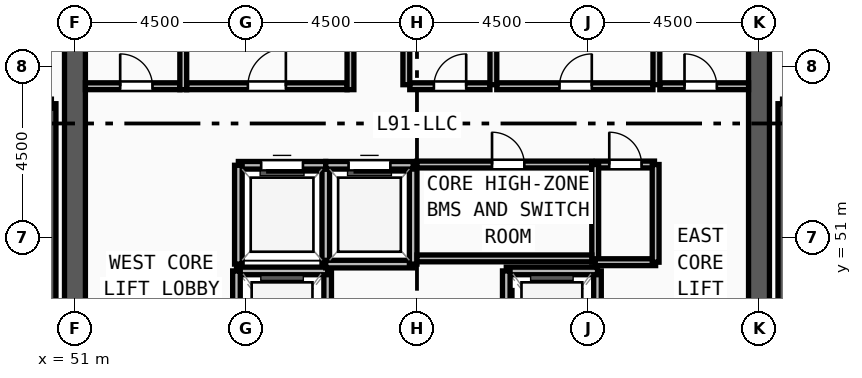
"""IFC4 building model, lengths in metres.
Left out: names, types, materials, properties, quantities, classifications, styles, units other than length and angle.
Written with IfcOpenShell. Run it as: python <this file> out.ifc"""

import sys

from ifc_helpers import new_model, si_unit, direction, frame, frame_2d, origin, place, context, subcontext, project, spatial, rectangle, extrude, source, transform, mapped, element, fill, save


model = new_model("IFC4")
c1 = context("Model", 3, precision=1e-05, world=origin(), true_north=direction((0.0, 1.0)))
c2 = subcontext(c1, "Body", "Model", "MODEL_VIEW")
j1 = project(units=[si_unit("LENGTHUNIT", "METRE"), si_unit("PLANEANGLEUNIT", "RADIAN")], contexts=[c1])
p1 = place(None, origin())
s1 = spatial("IfcSite", under=j1, at=p1, CompositionType="ELEMENT")
p2 = place(p1, origin())
s2 = spatial("IfcBuilding", under=s1, at=p2, CompositionType="ELEMENT")
p3 = place(p2, frame((0.0, 0.0, 351.0)))
s3 = spatial("IfcBuildingStorey", under=s2, at=p3, CompositionType="ELEMENT", Elevation=351.0)
p4 = place(p3, frame((69.0, 60.975, 0.0), z_axis=(0.0, 0.0, 1.0), x_axis=(0.0, -1.0, 0.0)))
e1 = element("IfcWall", 1, at=p4, inside=s3, PredefinedType="SHEAR", context=c2, shape_type="SweptSolid", body=[
    extrude(rectangle(XDim=13.95, YDim=0.55, at=frame_2d((6.975, 0.0))), origin(), (0.0, 0.0, 1.0), 4.52),
])
m1 = source(origin(), c2, "Body", "SweptSolid", [
    extrude(rectangle(XDim=1.2, YDim=2.2, at=frame_2d((0.6, 1.1))), frame((0.0, 0.285, 0.0), z_axis=(0.0, -1.0, 0.0), x_axis=(1.0, 0.0, 0.0)), (0.0, 0.0, 1.0), 0.57),
])
p5 = place(p4, frame((1.425, 0.0, 0.0)))
e2 = element("IfcOpeningElement", 2, at=p5, cuts=e1, PredefinedType="OPENING", context=c2, shape_type="MappedRepresentation", body=[
    mapped(m1, transform((0.0, 0.0, 0.0), x_axis=(1.0, 0.0, 0.0), y_axis=(0.0, 1.0, 0.0), z_axis=(0.0, 0.0, 1.0), scale=1.0)),
])
p6 = place(p3, frame((51.0, 47.025, 0.0), z_axis=(0.0, 0.0, 1.0), x_axis=(0.0, 1.0, 0.0)))
e3 = element("IfcWall", 3, at=p6, inside=s3, PredefinedType="SHEAR", context=c2, shape_type="SweptSolid", body=[
    extrude(rectangle(XDim=13.95, YDim=0.55, at=frame_2d((6.975, 0.0))), origin(), (0.0, 0.0, 1.0), 4.52),
])
for number, where, z_axis, x_axis in (
    (4, (50.38, 46.7, 0.0), (0.0, 0.0, 1.0), (0.0, 1.0, 0.0)),
    (5, (69.62, 54.52, 0.0), (0.0, 0.0, 1.0), (0.0, -1.0, 0.0)),
):
    element("IfcWall", number, at=place(p3, frame(where, z_axis=z_axis, x_axis=x_axis)), inside=s3, PredefinedType="SOLIDWALL", context=c2, shape_type="SweptSolid", body=[
        extrude(rectangle(XDim=7.82, YDim=0.24, at=frame_2d((3.91, 0.0))), origin(), (0.0, 0.0, 1.0), 4.52),
    ])
p7 = place(p3, frame((57.65, 47.12, 0.0), z_axis=(0.0, 0.0, 1.0), x_axis=(0.0, 1.0, 0.0)))
e6 = element("IfcWall", 6, at=p7, inside=s3, PredefinedType="SOLIDWALL", context=c2, shape_type="SweptSolid", body=[
    extrude(rectangle(XDim=3.0, YDim=0.2, at=frame_2d((1.5, 0.0))), origin(), (0.0, 0.0, 1.0), 4.52),
])
m2 = source(origin(), c2, "Body", "SweptSolid", [
    extrude(rectangle(XDim=1.2, YDim=2.3, at=frame_2d((0.6, 1.15))), frame((0.0, 0.11, 0.0), z_axis=(0.0, -1.0, 0.0), x_axis=(1.0, 0.0, 0.0)), (0.0, 0.0, 1.0), 0.22),
])
p8 = place(p7, frame((0.9, 0.0, 0.0)))
e7 = element("IfcOpeningElement", 7, at=p8, cuts=e6, PredefinedType="OPENING", context=c2, shape_type="MappedRepresentation", body=[
    mapped(m2, transform((0.0, 0.0, 0.0), x_axis=(1.0, 0.0, 0.0), y_axis=(0.0, 1.0, 0.0), z_axis=(0.0, 0.0, 1.0), scale=1.0)),
])
p9 = place(p3, frame((57.65, 50.12, 0.0), z_axis=(0.0, 0.0, 1.0), x_axis=(-1.0, 0.0, 0.0)))
e8 = element("IfcWall", 8, at=p9, inside=s3, PredefinedType="SOLIDWALL", context=c2, shape_type="SweptSolid", body=[
    extrude(rectangle(XDim=2.4, YDim=0.2, at=frame_2d((1.2, 0.0))), origin(), (0.0, 0.0, 1.0), 4.52),
])
for number, where, z_axis, x_axis in (
    (9, (55.25, 50.12, 0.0), (0.0, 0.0, 1.0), (0.0, -1.0, 0.0)),
    (10, (64.75, 47.12, 0.0), (0.0, 0.0, 1.0), (0.0, 1.0, 0.0)),
):
    element("IfcWall", number, at=place(p3, frame(where, z_axis=z_axis, x_axis=x_axis)), inside=s3, PredefinedType="SOLIDWALL", context=c2, shape_type="SweptSolid", body=[
        extrude(rectangle(XDim=3.0, YDim=0.2, at=frame_2d((1.5, 0.0))), origin(), (0.0, 0.0, 1.0), 4.52),
    ])
p10 = place(p3, frame((64.75, 50.12, 0.0), z_axis=(0.0, 0.0, 1.0), x_axis=(-1.0, 0.0, 0.0)))
e11 = element("IfcWall", 11, at=p10, inside=s3, PredefinedType="SOLIDWALL", context=c2, shape_type="SweptSolid", body=[
    extrude(rectangle(XDim=2.4, YDim=0.2, at=frame_2d((1.2, 0.0))), origin(), (0.0, 0.0, 1.0), 4.52),
])
p11 = place(p3, frame((62.35, 50.12, 0.0), z_axis=(0.0, 0.0, 1.0), x_axis=(0.0, -1.0, 0.0)))
e12 = element("IfcWall", 12, at=p11, inside=s3, PredefinedType="SOLIDWALL", context=c2, shape_type="SweptSolid", body=[
    extrude(rectangle(XDim=3.0, YDim=0.2, at=frame_2d((1.5, 0.0))), origin(), (0.0, 0.0, 1.0), 4.52),
])
p12 = place(p11, frame((0.9, 0.0, 0.0)))
e13 = element("IfcOpeningElement", 13, at=p12, cuts=e12, PredefinedType="OPENING", context=c2, shape_type="MappedRepresentation", body=[
    mapped(m2, transform((0.0, 0.0, 0.0), x_axis=(1.0, 0.0, 0.0), y_axis=(0.0, 1.0, 0.0), z_axis=(0.0, 0.0, 1.0), scale=1.0)),
])
p13 = place(p3, frame((57.6, 50.3, 0.0), z_axis=(0.0, 0.0, 1.0), x_axis=(0.0, 1.0, 0.0)))
e14 = element("IfcWall", 14, at=p13, inside=s3, PredefinedType="SOLIDWALL", context=c2, shape_type="SweptSolid", body=[
    extrude(rectangle(XDim=2.6, YDim=0.2, at=frame_2d((1.3, 0.0))), origin(), (0.0, 0.0, 1.0), 4.52),
])
p14 = place(p3, frame((57.6, 52.9, 0.0), z_axis=(0.0, 0.0, 1.0), x_axis=(-1.0, 0.0, 0.0)))
e15 = element("IfcWall", 15, at=p14, inside=s3, PredefinedType="SOLIDWALL", context=c2, shape_type="SweptSolid", body=[
    extrude(rectangle(XDim=2.3, YDim=0.2, at=frame_2d((1.15, 0.0))), origin(), (0.0, 0.0, 1.0), 4.52),
])
m3 = source(origin(), c2, "Body", "SweptSolid", [
    extrude(rectangle(XDim=1.1, YDim=2.2, at=frame_2d((0.55, 1.1))), frame((0.0, 0.11, 0.0), z_axis=(0.0, -1.0, 0.0), x_axis=(1.0, 0.0, 0.0)), (0.0, 0.0, 1.0), 0.22),
])
p15 = place(p14, frame((0.6, 0.0, 0.0)))
e16 = element("IfcOpeningElement", 16, at=p15, cuts=e15, PredefinedType="OPENING", context=c2, shape_type="MappedRepresentation", body=[
    mapped(m3, transform((0.0, 0.0, 0.0), x_axis=(1.0, 0.0, 0.0), y_axis=(0.0, 1.0, 0.0), z_axis=(0.0, 0.0, 1.0), scale=1.0)),
])
p16 = place(p3, frame((55.3, 52.9, 0.0), z_axis=(0.0, 0.0, 1.0), x_axis=(0.0, -1.0, 0.0)))
e17 = element("IfcWall", 17, at=p16, inside=s3, PredefinedType="SOLIDWALL", context=c2, shape_type="SweptSolid", body=[
    extrude(rectangle(XDim=2.6, YDim=0.2, at=frame_2d((1.3, 0.0))), origin(), (0.0, 0.0, 1.0), 4.52),
])
p17 = place(p3, frame((57.6, 50.3, 0.0), z_axis=(0.0, 0.0, 1.0), x_axis=(1.0, 0.0, 0.0)))
e18 = element("IfcWall", 18, at=p17, inside=s3, PredefinedType="SOLIDWALL", context=c2, shape_type="SweptSolid", body=[
    extrude(rectangle(XDim=2.3, YDim=0.2, at=frame_2d((1.15, 0.0))), origin(), (0.0, 0.0, 1.0), 4.52),
])
p18 = place(p3, frame((59.9, 50.3, 0.0), z_axis=(0.0, 0.0, 1.0), x_axis=(0.0, 1.0, 0.0)))
e19 = element("IfcWall", 19, at=p18, inside=s3, PredefinedType="SOLIDWALL", context=c2, shape_type="SweptSolid", body=[
    extrude(rectangle(XDim=2.6, YDim=0.2, at=frame_2d((1.3, 0.0))), origin(), (0.0, 0.0, 1.0), 4.52),
])
p19 = place(p3, frame((59.9, 52.9, 0.0), z_axis=(0.0, 0.0, 1.0), x_axis=(-1.0, 0.0, 0.0)))
e20 = element("IfcWall", 20, at=p19, inside=s3, PredefinedType="SOLIDWALL", context=c2, shape_type="SweptSolid", body=[
    extrude(rectangle(XDim=2.3, YDim=0.2, at=frame_2d((1.15, 0.0))), origin(), (0.0, 0.0, 1.0), 4.52),
])
p20 = place(p19, frame((0.6, 0.0, 0.0)))
e21 = element("IfcOpeningElement", 21, at=p20, cuts=e20, PredefinedType="OPENING", context=c2, shape_type="MappedRepresentation", body=[
    mapped(m3, transform((0.0, 0.0, 0.0), x_axis=(1.0, 0.0, 0.0), y_axis=(0.0, 1.0, 0.0), z_axis=(0.0, 0.0, 1.0), scale=1.0)),
])
p21 = place(p3, frame((60.0, 52.92, 0.0), z_axis=(0.0, 0.0, 1.0), x_axis=(1.0, 0.0, 0.0)))
e22 = element("IfcWall", 22, at=p21, inside=s3, PredefinedType="PARTITIONING", context=c2, shape_type="SweptSolid", body=[
    extrude(rectangle(XDim=4.6, YDim=0.18, at=frame_2d((2.3, 0.0))), origin(), (0.0, 0.0, 1.0), 4.52),
])
m4 = source(origin(), c2, "Body", "SweptSolid", [
    extrude(rectangle(XDim=0.85, YDim=2.1, at=frame_2d((0.425, 1.05))), frame((0.0, 0.1, 0.0), z_axis=(0.0, -1.0, 0.0), x_axis=(1.0, 0.0, 0.0)), (0.0, 0.0, 1.0), 0.2),
])
p22 = place(p21, frame((1.975, 0.0, 0.0)))
e23 = element("IfcOpeningElement", 23, at=p22, cuts=e22, PredefinedType="OPENING", context=c2, shape_type="MappedRepresentation", body=[
    mapped(m4, transform((0.0, 0.0, 0.0), x_axis=(1.0, 0.0, 0.0), y_axis=(0.0, 1.0, 0.0), z_axis=(0.0, 0.0, 1.0), scale=1.0)),
])
p23 = place(p3, frame((53.94, 54.98, 0.0), z_axis=(0.0, 0.0, 1.0), x_axis=(1.0, 0.0, 0.0)))
e24 = element("IfcWall", 24, at=p23, inside=s3, PredefinedType="PARTITIONING", context=c2, shape_type="SweptSolid", body=[
    extrude(rectangle(XDim=4.22, YDim=0.18, at=frame_2d((2.11, 0.0))), origin(), (0.0, 0.0, 1.0), 4.52),
])
m5 = source(origin(), c2, "Body", "SweptSolid", [
    extrude(rectangle(XDim=1.0, YDim=2.2, at=frame_2d((0.5, 1.1))), frame((0.0, 0.1, 0.0), z_axis=(0.0, -1.0, 0.0), x_axis=(1.0, 0.0, 0.0)), (0.0, 0.0, 1.0), 0.2),
])
p24 = place(p23, frame((1.61, 0.0, 0.0)))
e25 = element("IfcOpeningElement", 25, at=p24, cuts=e24, PredefinedType="OPENING", context=c2, shape_type="MappedRepresentation", body=[
    mapped(m5, transform((0.0, 0.0, 0.0), x_axis=(1.0, 0.0, 0.0), y_axis=(0.0, 1.0, 0.0), z_axis=(0.0, 0.0, 1.0), scale=1.0)),
])
p25 = place(p3, frame((51.275, 54.98, 0.0), z_axis=(0.0, 0.0, 1.0), x_axis=(1.0, 0.0, 0.0)))
e26 = element("IfcWall", 26, at=p25, inside=s3, PredefinedType="PARTITIONING", context=c2, shape_type="SweptSolid", body=[
    extrude(rectangle(XDim=2.485, YDim=0.18, at=frame_2d((1.243, 0.0))), origin(), (0.0, 0.0, 1.0), 4.52),
])
p26 = place(p25, frame((0.915, 0.0, 0.0)))
e27 = element("IfcOpeningElement", 27, at=p26, cuts=e26, PredefinedType="OPENING", context=c2, shape_type="MappedRepresentation", body=[
    mapped(m4, transform((0.0, 0.0, 0.0), x_axis=(1.0, 0.0, 0.0), y_axis=(0.0, 1.0, 0.0), z_axis=(0.0, 0.0, 1.0), scale=1.0)),
])
p27 = place(p3, frame((62.1, 54.98, 0.0), z_axis=(0.0, 0.0, 1.0), x_axis=(1.0, 0.0, 0.0)))
e28 = element("IfcWall", 28, at=p27, inside=s3, PredefinedType="PARTITIONING", context=c2, shape_type="SweptSolid", body=[
    extrude(rectangle(XDim=4.11, YDim=0.18, at=frame_2d((2.055, 0.0))), origin(), (0.0, 0.0, 1.0), 4.52),
])
p28 = place(p27, frame((1.65, 0.0, 0.0)))
e29 = element("IfcOpeningElement", 29, at=p28, cuts=e28, PredefinedType="OPENING", context=c2, shape_type="MappedRepresentation", body=[
    mapped(m4, transform((0.0, 0.0, 0.0), x_axis=(1.0, 0.0, 0.0), y_axis=(0.0, 1.0, 0.0), z_axis=(0.0, 0.0, 1.0), scale=1.0)),
])
p29 = place(p3, frame((66.39, 54.98, 0.0), z_axis=(0.0, 0.0, 1.0), x_axis=(1.0, 0.0, 0.0)))
e30 = element("IfcWall", 30, at=p29, inside=s3, PredefinedType="PARTITIONING", context=c2, shape_type="SweptSolid", body=[
    extrude(rectangle(XDim=2.335, YDim=0.18, at=frame_2d((1.167, 0.0))), origin(), (0.0, 0.0, 1.0), 4.52),
])
p30 = place(p29, frame((0.65, 0.0, 0.0)))
e31 = element("IfcOpeningElement", 31, at=p30, cuts=e30, PredefinedType="OPENING", context=c2, shape_type="MappedRepresentation", body=[
    mapped(m4, transform((0.0, 0.0, 0.0), x_axis=(1.0, 0.0, 0.0), y_axis=(0.0, 1.0, 0.0), z_axis=(0.0, 0.0, 1.0), scale=1.0)),
])
p31 = place(p3, frame((59.81, 54.98, 0.0), z_axis=(0.0, 0.0, 1.0), x_axis=(1.0, 0.0, 0.0)))
e32 = element("IfcWall", 32, at=p31, inside=s3, PredefinedType="PARTITIONING", context=c2, shape_type="SweptSolid", body=[
    extrude(rectangle(XDim=2.11, YDim=0.18, at=frame_2d((1.055, 0.0))), origin(), (0.0, 0.0, 1.0), 4.52),
])
p32 = place(p31, frame((0.635, 0.0, 0.0)))
e33 = element("IfcOpeningElement", 33, at=p32, cuts=e32, PredefinedType="OPENING", context=c2, shape_type="MappedRepresentation", body=[
    mapped(m4, transform((0.0, 0.0, 0.0), x_axis=(1.0, 0.0, 0.0), y_axis=(0.0, 1.0, 0.0), z_axis=(0.0, 0.0, 1.0), scale=1.0)),
])
p33 = place(p3, frame((64.72, 52.92, 0.0), z_axis=(0.0, 0.0, 1.0), x_axis=(1.0, 0.0, 0.0)))
e34 = element("IfcWall", 34, at=p33, inside=s3, PredefinedType="PARTITIONING", context=c2, shape_type="SweptSolid", body=[
    extrude(rectangle(XDim=1.53, YDim=0.18, at=frame_2d((0.765, 0.0))), origin(), (0.0, 0.0, 1.0), 4.52),
])
p34 = place(p33, frame((0.34, 0.0, 0.0)))
e35 = element("IfcOpeningElement", 35, at=p34, cuts=e34, PredefinedType="OPENING", context=c2, shape_type="MappedRepresentation", body=[
    mapped(m4, transform((0.0, 0.0, 0.0), x_axis=(1.0, 0.0, 0.0), y_axis=(0.0, 1.0, 0.0), z_axis=(0.0, 0.0, 1.0), scale=1.0)),
])
p35 = place(p3, frame((66.3, 55.02, 0.0), z_axis=(0.0, 0.0, 1.0), x_axis=(0.0, 1.0, 0.0)))
e36 = element("IfcWall", 36, at=p35, inside=s3, PredefinedType="PARTITIONING", context=c2, shape_type="SweptSolid", body=[
    extrude(rectangle(XDim=2.86, YDim=0.18, at=frame_2d((1.43, 0.0))), origin(), (0.0, 0.0, 1.0), 4.52),
])
for number, where, z_axis, x_axis in (
    (37, (59.72, 55.02, 0.0), (0.0, 0.0, 1.0), (0.0, 1.0, 0.0)),
    (38, (62.01, 55.02, 0.0), (0.0, 0.0, 1.0), (0.0, 1.0, 0.0)),
):
    element("IfcWall", number, at=place(p3, frame(where, z_axis=z_axis, x_axis=x_axis)), inside=s3, PredefinedType="PARTITIONING", context=c2, shape_type="SweptSolid", body=[
        extrude(rectangle(XDim=1.73, YDim=0.18, at=frame_2d((0.865, 0.0))), origin(), (0.0, 0.0, 1.0), 4.52),
    ])
p36 = place(p3, frame((64.69, 50.35, 0.0), z_axis=(0.0, 0.0, 1.0), x_axis=(0.0, 1.0, 0.0)))
e39 = element("IfcWall", 39, at=p36, inside=s3, PredefinedType="PARTITIONING", context=c2, shape_type="SweptSolid", body=[
    extrude(rectangle(XDim=2.57, YDim=0.18, at=frame_2d((1.285, 0.0))), origin(), (0.0, 0.0, 1.0), 4.52),
])
p37 = place(p3, frame((64.69, 50.35, 0.0), z_axis=(0.0, 0.0, 1.0), x_axis=(1.0, 0.0, 0.0)))
e40 = element("IfcWall", 40, at=p37, inside=s3, PredefinedType="PARTITIONING", context=c2, shape_type="SweptSolid", body=[
    extrude(rectangle(XDim=1.59, YDim=0.18, at=frame_2d((0.795, 0.0))), origin(), (0.0, 0.0, 1.0), 4.52),
])
p38 = place(p3, frame((66.28, 50.35, 0.0), z_axis=(0.0, 0.0, 1.0), x_axis=(0.0, 1.0, 0.0)))
e41 = element("IfcWall", 41, at=p38, inside=s3, PredefinedType="PARTITIONING", context=c2, shape_type="SweptSolid", body=[
    extrude(rectangle(XDim=2.57, YDim=0.18, at=frame_2d((1.285, 0.0))), origin(), (0.0, 0.0, 1.0), 4.52),
])
p39 = place(p3, frame((60.0, 50.45, 0.0), z_axis=(0.0, 0.0, 1.0), x_axis=(1.0, 0.0, 0.0)))
e42 = element("IfcWall", 42, at=p39, inside=s3, PredefinedType="PARTITIONING", context=c2, shape_type="SweptSolid", body=[
    extrude(rectangle(XDim=4.6, YDim=0.18, at=frame_2d((2.3, 0.0))), origin(), (0.0, 0.0, 1.0), 4.52),
])
for number, where, z_axis, x_axis in (
    (43, (53.85, 54.89, 0.0), (0.0, 0.0, 1.0), (0.0, 1.0, 0.0)),
    (44, (58.25, 54.89, 0.0), (0.0, 0.0, 1.0), (0.0, 1.0, 0.0)),
):
    element("IfcWall", number, at=place(p3, frame(where, z_axis=z_axis, x_axis=x_axis)), inside=s3, PredefinedType="PARTITIONING", context=c2, shape_type="SweptSolid", body=[
        extrude(rectangle(XDim=2.78, YDim=0.18, at=frame_2d((1.39, 0.0))), origin(), (0.0, 0.0, 1.0), 4.52),
    ])
m6 = source(origin(), c2, "Body", "SweptSolid", [
    extrude(rectangle(XDim=1.1, YDim=2.2, at=frame_2d((0.55, 1.1))), frame((0.0, 0.025, 0.0), z_axis=(0.0, -1.0, 0.0), x_axis=(1.0, 0.0, 0.0)), (0.0, 0.0, 1.0), 0.05),
])
p40 = place(p15, origin())
e45 = element("IfcDoor", 45, at=p40, inside=s3, OperationType="SLIDING_TO_LEFT", PredefinedType="DOOR", context=c2, shape_type="MappedRepresentation", body=[
    mapped(m6, transform((0.0, 0.0, 0.0), x_axis=(1.0, 0.0, 0.0), y_axis=(0.0, 1.0, 0.0), z_axis=(0.0, 0.0, 1.0), scale=1.0)),
])
fill(e16, e45)
p41 = place(p20, origin())
e46 = element("IfcDoor", 46, at=p41, inside=s3, OperationType="SLIDING_TO_LEFT", PredefinedType="DOOR", context=c2, shape_type="MappedRepresentation", body=[
    mapped(m6, transform((0.0, 0.0, 0.0), x_axis=(1.0, 0.0, 0.0), y_axis=(0.0, 1.0, 0.0), z_axis=(0.0, 0.0, 1.0), scale=1.0)),
])
fill(e21, e46)
m7 = source(origin(), c2, "Body", "SweptSolid", [
    extrude(rectangle(XDim=0.85, YDim=2.1, at=frame_2d((0.425, 1.05))), frame((0.0, 0.025, 0.0), z_axis=(0.0, -1.0, 0.0), x_axis=(1.0, 0.0, 0.0)), (0.0, 0.0, 1.0), 0.05),
])
p42 = place(p22, origin())
e47 = element("IfcDoor", 47, at=p42, inside=s3, OperationType="SINGLE_SWING_LEFT", PredefinedType="DOOR", context=c2, shape_type="MappedRepresentation", body=[
    mapped(m7, transform((0.0, 0.0, 0.0), x_axis=(1.0, 0.0, 0.0), y_axis=(0.0, 1.0, 0.0), z_axis=(0.0, 0.0, 1.0), scale=1.0)),
])
fill(e23, e47)
m8 = source(origin(), c2, "Body", "SweptSolid", [
    extrude(rectangle(XDim=1.0, YDim=2.2, at=frame_2d((0.5, 1.1))), frame((0.0, 0.025, 0.0), z_axis=(0.0, -1.0, 0.0), x_axis=(1.0, 0.0, 0.0)), (0.0, 0.0, 1.0), 0.05),
])
p43 = place(p24, origin())
e48 = element("IfcDoor", 48, at=p43, inside=s3, OperationType="SINGLE_SWING_RIGHT", PredefinedType="DOOR", context=c2, shape_type="MappedRepresentation", body=[
    mapped(m8, transform((0.0, 0.0, 0.0), x_axis=(1.0, 0.0, 0.0), y_axis=(0.0, 1.0, 0.0), z_axis=(0.0, 0.0, 1.0), scale=1.0)),
])
fill(e25, e48)
p44 = place(p26, origin())
e49 = element("IfcDoor", 49, at=p44, inside=s3, OperationType="SINGLE_SWING_LEFT", PredefinedType="DOOR", context=c2, shape_type="MappedRepresentation", body=[
    mapped(m7, transform((0.0, 0.0, 0.0), x_axis=(1.0, 0.0, 0.0), y_axis=(0.0, 1.0, 0.0), z_axis=(0.0, 0.0, 1.0), scale=1.0)),
])
fill(e27, e49)
p45 = place(p28, origin())
e50 = element("IfcDoor", 50, at=p45, inside=s3, OperationType="SINGLE_SWING_RIGHT", PredefinedType="DOOR", context=c2, shape_type="MappedRepresentation", body=[
    mapped(m7, transform((0.0, 0.0, 0.0), x_axis=(1.0, 0.0, 0.0), y_axis=(0.0, 1.0, 0.0), z_axis=(0.0, 0.0, 1.0), scale=1.0)),
])
fill(e29, e50)
p46 = place(p30, origin())
e51 = element("IfcDoor", 51, at=p46, inside=s3, OperationType="SINGLE_SWING_LEFT", PredefinedType="DOOR", context=c2, shape_type="MappedRepresentation", body=[
    mapped(m7, transform((0.0, 0.0, 0.0), x_axis=(1.0, 0.0, 0.0), y_axis=(0.0, 1.0, 0.0), z_axis=(0.0, 0.0, 1.0), scale=1.0)),
])
fill(e31, e51)
p47 = place(p32, origin())
e52 = element("IfcDoor", 52, at=p47, inside=s3, OperationType="SINGLE_SWING_RIGHT", PredefinedType="DOOR", context=c2, shape_type="MappedRepresentation", body=[
    mapped(m7, transform((0.0, 0.0, 0.0), x_axis=(1.0, 0.0, 0.0), y_axis=(0.0, 1.0, 0.0), z_axis=(0.0, 0.0, 1.0), scale=1.0)),
])
fill(e33, e52)
p48 = place(p34, origin())
e53 = element("IfcDoor", 53, at=p48, inside=s3, OperationType="SINGLE_SWING_LEFT", PredefinedType="DOOR", context=c2, shape_type="MappedRepresentation", body=[
    mapped(m7, transform((0.0, 0.0, 0.0), x_axis=(1.0, 0.0, 0.0), y_axis=(0.0, 1.0, 0.0), z_axis=(0.0, 0.0, 1.0), scale=1.0)),
])
fill(e35, e53)
save(model, sys.argv[1])
